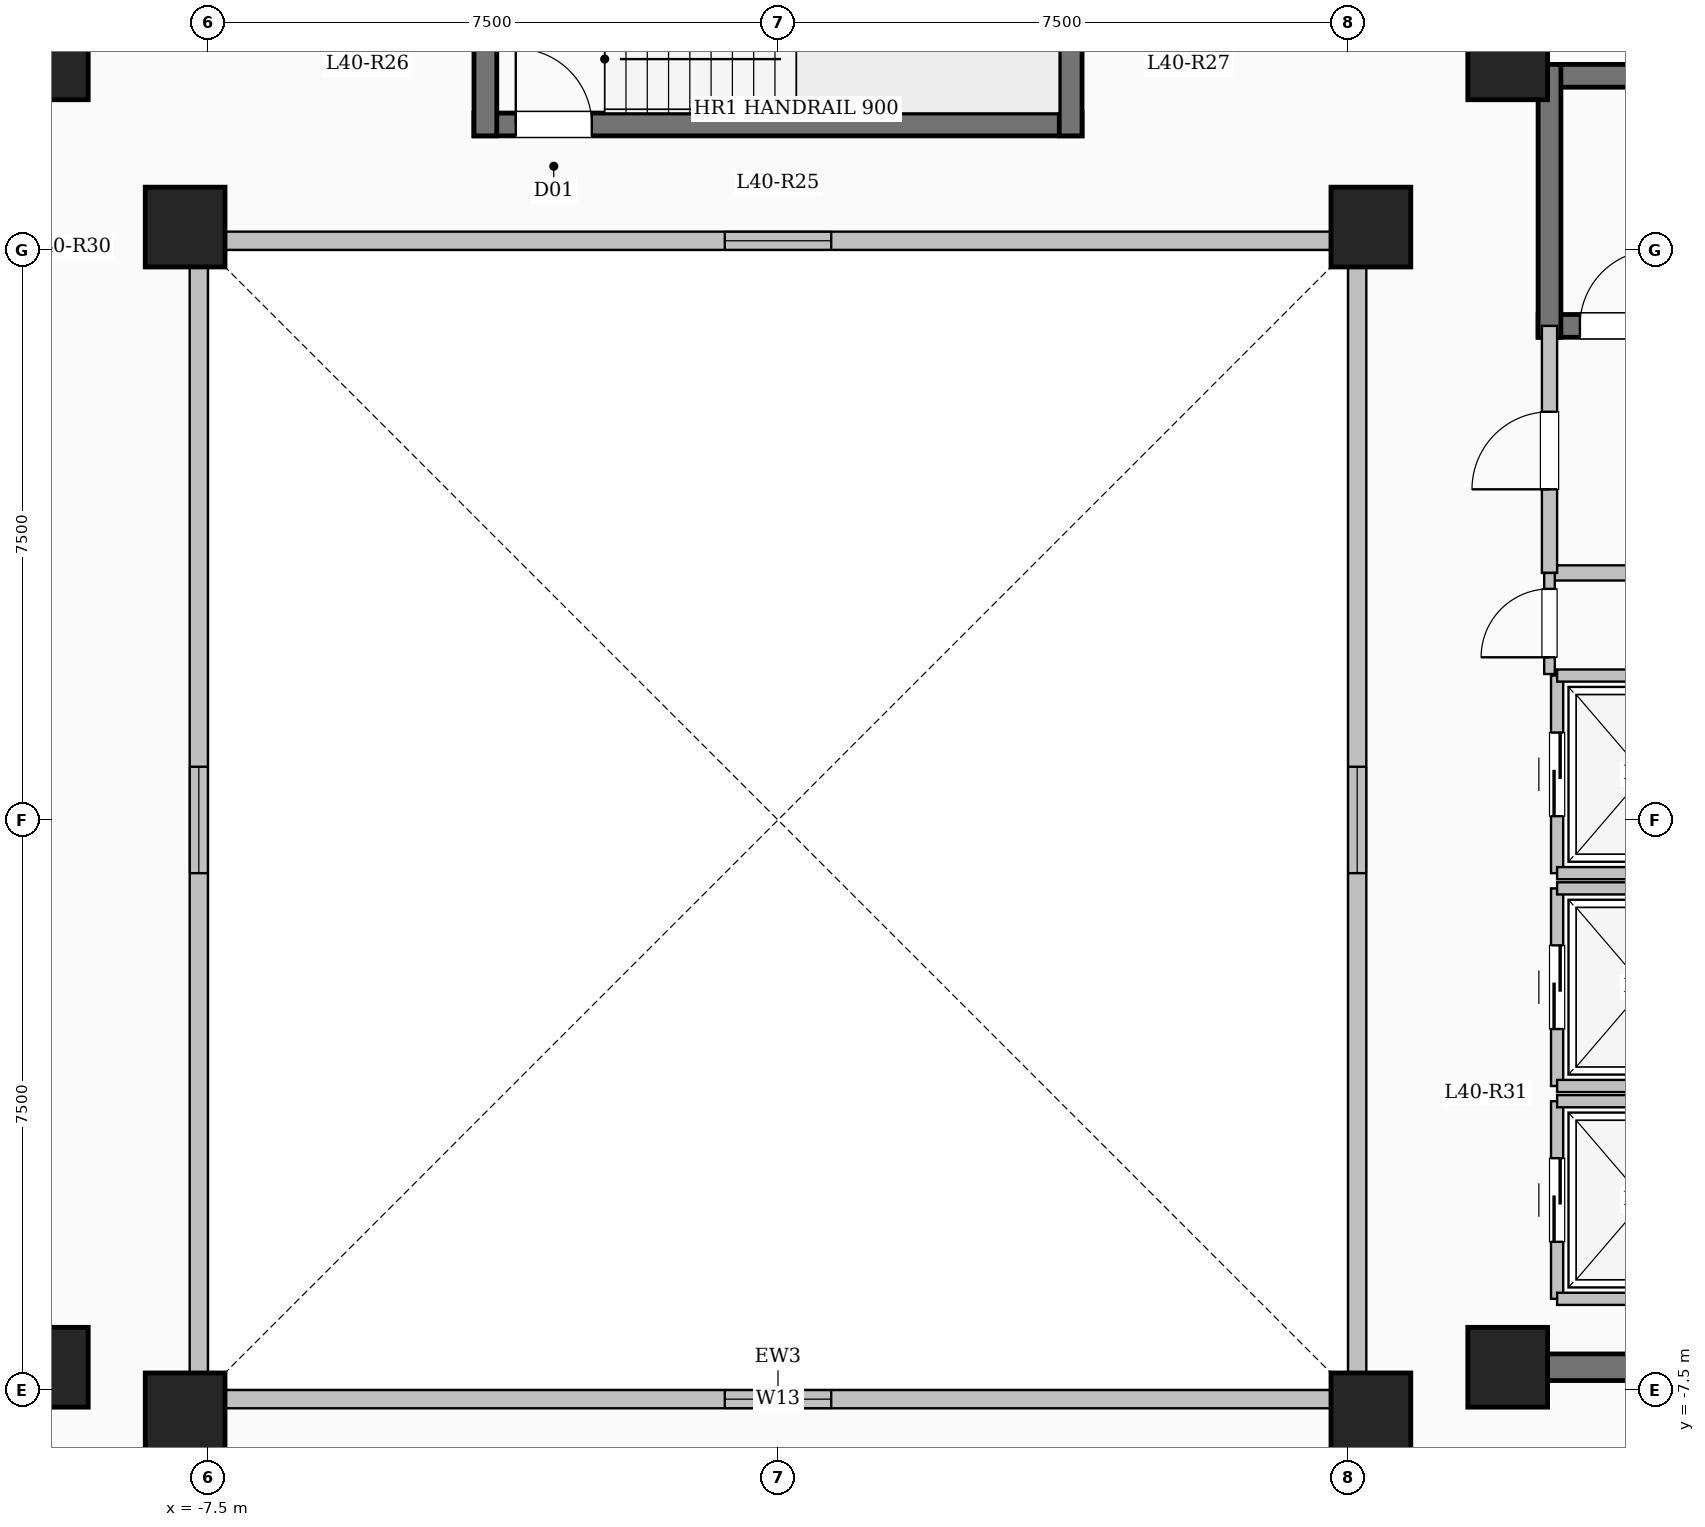
"""IFC4 building model, lengths in metres.
Left out: names, types, materials, properties, quantities, classifications, styles, units other than length and angle.
Written with IfcOpenShell. Run it as: python <this file> out.ifc"""

import sys

from ifc_helpers import new_model, si_unit, direction, frame, frame_2d, origin, origin_2d, place, context, subcontext, project, spatial, rectangle, extrude, element, fill, save


model = new_model("IFC4")
c1 = context("Model", 3, precision=1e-05, world=origin(), true_north=direction((0.0, 1.0)))
c2 = subcontext(c1, "Body", "Model", "MODEL_VIEW")
j1 = project(units=[si_unit("LENGTHUNIT", "METRE"), si_unit("PLANEANGLEUNIT", "RADIAN")], contexts=[c1])
p1 = place(None, origin())
s1 = spatial("IfcSite", under=j1, at=p1, CompositionType="ELEMENT")
p2 = place(p1, origin())
s2 = spatial("IfcBuilding", under=s1, at=p2, CompositionType="ELEMENT")
p3 = place(p2, frame((0.0, 0.0, 149.35)))
s3 = spatial("IfcBuildingStorey", under=s2, at=p3, CompositionType="ELEMENT", Elevation=149.35)
for number, where, z_axis, x_axis in (
    (1, (-7.8, -7.8, 0.0), (0.0, 0.0, 1.0), (1.0, 0.0, 0.0)),
    (2, (7.8, -7.8, 0.0), (0.0, 0.0, 1.0), (1.0, 0.0, 0.0)),
    (3, (-7.8, 7.8, 0.0), (0.0, 0.0, 1.0), (1.0, 0.0, 0.0)),
    (4, (7.8, 7.8, 0.0), (0.0, 0.0, 1.0), (1.0, 0.0, 0.0)),
    (5, (-9.6, -7.2, 0.0), (0.0, 0.0, 1.0), (1.0, 0.0, 0.0)),
    (6, (-9.6, 10.0, 0.0), (0.0, 0.0, 1.0), (1.0, 0.0, 0.0)),
    (7, (9.6, -7.2, 0.0), (0.0, 0.0, 1.0), (1.0, 0.0, 0.0)),
    (8, (9.6, 10.0, 0.0), (0.0, 0.0, 1.0), (1.0, 0.0, 0.0)),
):
    element("IfcColumn", number, at=place(p3, frame(where, z_axis=z_axis, x_axis=x_axis)), inside=s3, PredefinedType="COLUMN", context=c2, shape_type="SweptSolid", body=[
        extrude(rectangle(XDim=1.05, YDim=1.05, at=origin_2d()), origin(), (0.0, 0.0, 1.0), 3.35),
    ])
p4 = place(p3, frame((-7.62, -7.62, 0.0), z_axis=(0.0, 0.0, 1.0), x_axis=(1.0, 0.0, 0.0)))
e9 = element("IfcWall", 9, at=p4, inside=s3, PredefinedType="SOLIDWALL", context=c2, shape_type="SweptSolid", body=[
    extrude(rectangle(XDim=15.24, YDim=0.24, at=frame_2d((7.62, 0.0))), origin(), (0.0, 0.0, 1.0), 3.1),
])
p5 = place(p4, frame((6.92, 0.0, 0.95)))
e10 = element("IfcOpeningElement", 10, at=p5, cuts=e9, PredefinedType="OPENING", context=c2, shape_type="SweptSolid", body=[
    extrude(rectangle(XDim=1.4, YDim=1.5, at=frame_2d((0.7, 0.75))), frame((0.0, 0.13, 0.0), z_axis=(0.0, -1.0, 0.0), x_axis=(1.0, 0.0, 0.0)), (0.0, 0.0, 1.0), 0.26),
])
p6 = place(p3, frame((7.62, -7.62, 0.0), z_axis=(0.0, 0.0, 1.0), x_axis=(0.0, 1.0, 0.0)))
e11 = element("IfcWall", 11, at=p6, inside=s3, PredefinedType="SOLIDWALL", context=c2, shape_type="SweptSolid", body=[
    extrude(rectangle(XDim=15.24, YDim=0.24, at=frame_2d((7.62, 0.0))), origin(), (0.0, 0.0, 1.0), 3.1),
])
p7 = place(p6, frame((6.92, 0.0, 0.95)))
e12 = element("IfcOpeningElement", 12, at=p7, cuts=e11, PredefinedType="OPENING", context=c2, shape_type="SweptSolid", body=[
    extrude(rectangle(XDim=1.4, YDim=1.5, at=frame_2d((0.7, 0.75))), frame((0.0, 0.13, 0.0), z_axis=(0.0, -1.0, 0.0), x_axis=(1.0, 0.0, 0.0)), (0.0, 0.0, 1.0), 0.26),
])
p8 = place(p3, frame((7.62, 7.62, 0.0), z_axis=(0.0, 0.0, 1.0), x_axis=(-1.0, 0.0, 0.0)))
e13 = element("IfcWall", 13, at=p8, inside=s3, PredefinedType="SOLIDWALL", context=c2, shape_type="SweptSolid", body=[
    extrude(rectangle(XDim=15.24, YDim=0.24, at=frame_2d((7.62, 0.0))), origin(), (0.0, 0.0, 1.0), 3.1),
])
p9 = place(p8, frame((6.92, 0.0, 0.95)))
e14 = element("IfcOpeningElement", 14, at=p9, cuts=e13, PredefinedType="OPENING", context=c2, shape_type="SweptSolid", body=[
    extrude(rectangle(XDim=1.4, YDim=1.5, at=frame_2d((0.7, 0.75))), frame((0.0, 0.13, 0.0), z_axis=(0.0, -1.0, 0.0), x_axis=(1.0, 0.0, 0.0)), (0.0, 0.0, 1.0), 0.26),
])
p10 = place(p3, frame((-7.62, 7.62, 0.0), z_axis=(0.0, 0.0, 1.0), x_axis=(0.0, -1.0, 0.0)))
e15 = element("IfcWall", 15, at=p10, inside=s3, PredefinedType="SOLIDWALL", context=c2, shape_type="SweptSolid", body=[
    extrude(rectangle(XDim=15.24, YDim=0.24, at=frame_2d((7.62, 0.0))), origin(), (0.0, 0.0, 1.0), 3.1),
])
p11 = place(p10, frame((6.92, 0.0, 0.95)))
e16 = element("IfcOpeningElement", 16, at=p11, cuts=e15, PredefinedType="OPENING", context=c2, shape_type="SweptSolid", body=[
    extrude(rectangle(XDim=1.4, YDim=1.5, at=frame_2d((0.7, 0.75))), frame((0.0, 0.13, 0.0), z_axis=(0.0, -1.0, 0.0), x_axis=(1.0, 0.0, 0.0)), (0.0, 0.0, 1.0), 0.26),
])
p12 = place(p3, frame((10.0, 9.79, 0.0), z_axis=(0.0, 0.0, 1.0), x_axis=(1.0, 0.0, 0.0)))
e17 = element("IfcWall", 17, at=p12, inside=s3, PredefinedType="SHEAR", context=c2, shape_type="SweptSolid", body=[
    extrude(rectangle(XDim=8.0, YDim=0.3, at=frame_2d((4.0, 0.0))), origin(), (0.0, 0.0, 1.0), 3.35),
])
p13 = place(p3, frame((10.0, 6.5, 0.0), z_axis=(0.0, 0.0, 1.0), x_axis=(1.0, 0.0, 0.0)))
e18 = element("IfcWall", 18, at=p13, inside=s3, PredefinedType="SHEAR", context=c2, shape_type="SweptSolid", body=[
    extrude(rectangle(XDim=8.0, YDim=0.3, at=frame_2d((4.0, 0.0))), origin(), (0.0, 0.0, 1.0), 3.35),
])
p14 = place(p13, frame((0.55, 0.0, 0.0)))
e19 = element("IfcOpeningElement", 19, at=p14, cuts=e18, PredefinedType="OPENING", context=c2, shape_type="SweptSolid", body=[
    extrude(rectangle(XDim=1.0, YDim=2.15, at=frame_2d((0.5, 1.075))), frame((0.0, 0.16, 0.0), z_axis=(0.0, -1.0, 0.0), x_axis=(1.0, 0.0, 0.0)), (0.0, 0.0, 1.0), 0.32),
])
p15 = place(p3, frame((10.15, 6.35, 0.0), z_axis=(0.0, 0.0, 1.0), x_axis=(0.0, 1.0, 0.0)))
e20 = element("IfcWall", 20, at=p15, inside=s3, PredefinedType="SHEAR", context=c2, shape_type="SweptSolid", body=[
    extrude(rectangle(XDim=3.59, YDim=0.3, at=frame_2d((1.795, 0.0))), origin(), (0.0, 0.0, 1.0), 3.35),
])
p16 = place(p3, frame((-4.0, 9.15, 0.0), z_axis=(0.0, 0.0, 1.0), x_axis=(1.0, 0.0, 0.0)))
e21 = element("IfcWall", 21, at=p16, inside=s3, PredefinedType="SHEAR", context=c2, shape_type="SweptSolid", body=[
    extrude(rectangle(XDim=8.0, YDim=0.3, at=frame_2d((4.0, 0.0))), origin(), (0.0, 0.0, 1.0), 3.35),
])
p17 = place(p16, frame((0.55, 0.0, 0.0)))
e22 = element("IfcOpeningElement", 22, at=p17, cuts=e21, PredefinedType="OPENING", context=c2, shape_type="SweptSolid", body=[
    extrude(rectangle(XDim=1.0, YDim=2.15, at=frame_2d((0.5, 1.075))), frame((0.0, 0.16, 0.0), z_axis=(0.0, -1.0, 0.0), x_axis=(1.0, 0.0, 0.0)), (0.0, 0.0, 1.0), 0.32),
])
for number, where, z_axis, x_axis in (
    (23, (-3.85, 9.0, 0.0), (0.0, 0.0, 1.0), (0.0, 1.0, 0.0)),
    (24, (3.85, 9.0, 0.0), (0.0, 0.0, 1.0), (0.0, 1.0, 0.0)),
):
    element("IfcWall", number, at=place(p3, frame(where, z_axis=z_axis, x_axis=x_axis)), inside=s3, PredefinedType="SHEAR", context=c2, shape_type="SweptSolid", body=[
        extrude(rectangle(XDim=3.59, YDim=0.3, at=frame_2d((1.795, 0.0))), origin(), (0.0, 0.0, 1.0), 3.35),
    ])
p18 = place(p3, frame((10.15, 3.25, 0.0), z_axis=(0.0, 0.0, 1.0), x_axis=(1.0, 0.0, 0.0)))
e25 = element("IfcWall", 25, at=p18, inside=s3, PredefinedType="SOLIDWALL", context=c2, shape_type="SweptSolid", body=[
    extrude(rectangle(XDim=5.4, YDim=0.2, at=frame_2d((2.7, 0.0))), origin(), (0.0, 0.0, 1.0), 3.1),
])
p19 = place(p3, frame((10.15, 3.25, 0.0), z_axis=(0.0, 0.0, 1.0), x_axis=(0.0, 1.0, 0.0)))
e26 = element("IfcWall", 26, at=p19, inside=s3, PredefinedType="SOLIDWALL", context=c2, shape_type="SweptSolid", body=[
    extrude(rectangle(XDim=3.25, YDim=0.2, at=frame_2d((1.625, 0.0))), origin(), (0.0, 0.0, 1.0), 3.1),
])
p20 = place(p19, frame((1.1, 0.0, 0.0)))
e27 = element("IfcOpeningElement", 27, at=p20, cuts=e26, PredefinedType="OPENING", context=c2, shape_type="SweptSolid", body=[
    extrude(rectangle(XDim=1.02, YDim=2.15, at=frame_2d((0.51, 1.075))), frame((0.0, 0.11, 0.0), z_axis=(0.0, -1.0, 0.0), x_axis=(1.0, 0.0, 0.0)), (0.0, 0.0, 1.0), 0.22),
])
p21 = place(p3, frame((10.25, -6.3, 0.0), z_axis=(0.0, 0.0, 1.0), x_axis=(0.0, 1.0, 0.0)))
e28 = element("IfcWall", 28, at=p21, inside=s3, PredefinedType="SOLIDWALL", context=c2, shape_type="SweptSolid", body=[
    extrude(rectangle(XDim=2.6, YDim=0.16, at=frame_2d((1.3, 0.0))), origin(), (0.0, 0.0, 1.0), 3.1),
])
p22 = place(p21, frame((0.75, 0.0, 0.0)))
e29 = element("IfcOpeningElement", 29, at=p22, cuts=e28, PredefinedType="OPENING", context=c2, shape_type="SweptSolid", body=[
    extrude(rectangle(XDim=1.1, YDim=2.15, at=frame_2d((0.55, 1.075))), frame((0.0, 0.09, 0.0), z_axis=(0.0, -1.0, 0.0), x_axis=(1.0, 0.0, 0.0)), (0.0, 0.0, 1.0), 0.18),
])
for number, where, z_axis, x_axis in (
    (30, (10.25, -6.3, 0.0), (0.0, 0.0, 1.0), (1.0, 0.0, 0.0)),
    (31, (10.25, -3.7, 0.0), (0.0, 0.0, 1.0), (1.0, 0.0, 0.0)),
):
    element("IfcWall", number, at=place(p3, frame(where, z_axis=z_axis, x_axis=x_axis)), inside=s3, PredefinedType="SOLIDWALL", context=c2, shape_type="SweptSolid", body=[
        extrude(rectangle(XDim=2.3, YDim=0.16, at=frame_2d((1.15, 0.0))), origin(), (0.0, 0.0, 1.0), 3.1),
    ])
p23 = place(p3, frame((10.25, -3.5, 0.0), z_axis=(0.0, 0.0, 1.0), x_axis=(0.0, 1.0, 0.0)))
e32 = element("IfcWall", 32, at=p23, inside=s3, PredefinedType="SOLIDWALL", context=c2, shape_type="SweptSolid", body=[
    extrude(rectangle(XDim=2.6, YDim=0.16, at=frame_2d((1.3, 0.0))), origin(), (0.0, 0.0, 1.0), 3.1),
])
p24 = place(p23, frame((0.75, 0.0, 0.0)))
e33 = element("IfcOpeningElement", 33, at=p24, cuts=e32, PredefinedType="OPENING", context=c2, shape_type="SweptSolid", body=[
    extrude(rectangle(XDim=1.1, YDim=2.15, at=frame_2d((0.55, 1.075))), frame((0.0, 0.09, 0.0), z_axis=(0.0, -1.0, 0.0), x_axis=(1.0, 0.0, 0.0)), (0.0, 0.0, 1.0), 0.18),
])
for number, where, z_axis, x_axis in (
    (34, (10.25, -3.5, 0.0), (0.0, 0.0, 1.0), (1.0, 0.0, 0.0)),
    (35, (10.25, -0.9, 0.0), (0.0, 0.0, 1.0), (1.0, 0.0, 0.0)),
):
    element("IfcWall", number, at=place(p3, frame(where, z_axis=z_axis, x_axis=x_axis)), inside=s3, PredefinedType="SOLIDWALL", context=c2, shape_type="SweptSolid", body=[
        extrude(rectangle(XDim=2.3, YDim=0.16, at=frame_2d((1.15, 0.0))), origin(), (0.0, 0.0, 1.0), 3.1),
    ])
p25 = place(p3, frame((10.25, -0.7, 0.0), z_axis=(0.0, 0.0, 1.0), x_axis=(0.0, 1.0, 0.0)))
e36 = element("IfcWall", 36, at=p25, inside=s3, PredefinedType="SOLIDWALL", context=c2, shape_type="SweptSolid", body=[
    extrude(rectangle(XDim=2.6, YDim=0.16, at=frame_2d((1.3, 0.0))), origin(), (0.0, 0.0, 1.0), 3.1),
])
p26 = place(p25, frame((0.75, 0.0, 0.0)))
e37 = element("IfcOpeningElement", 37, at=p26, cuts=e36, PredefinedType="OPENING", context=c2, shape_type="SweptSolid", body=[
    extrude(rectangle(XDim=1.1, YDim=2.15, at=frame_2d((0.55, 1.075))), frame((0.0, 0.09, 0.0), z_axis=(0.0, -1.0, 0.0), x_axis=(1.0, 0.0, 0.0)), (0.0, 0.0, 1.0), 0.18),
])
for number, where, z_axis, x_axis in (
    (38, (10.25, -0.7, 0.0), (0.0, 0.0, 1.0), (1.0, 0.0, 0.0)),
    (39, (10.25, 1.9, 0.0), (0.0, 0.0, 1.0), (1.0, 0.0, 0.0)),
):
    element("IfcWall", number, at=place(p3, frame(where, z_axis=z_axis, x_axis=x_axis)), inside=s3, PredefinedType="SOLIDWALL", context=c2, shape_type="SweptSolid", body=[
        extrude(rectangle(XDim=2.3, YDim=0.16, at=frame_2d((1.15, 0.0))), origin(), (0.0, 0.0, 1.0), 3.1),
    ])
p27 = place(p3, frame((10.075, -7.2, 0.0), z_axis=(0.0, 0.0, 1.0), x_axis=(1.0, 0.0, 0.0)))
e40 = element("IfcWall", 40, at=p27, inside=s3, PredefinedType="SHEAR", context=c2, shape_type="SweptSolid", body=[
    extrude(rectangle(XDim=8.55, YDim=0.35, at=frame_2d((4.275, 0.0))), origin(), (0.0, 0.0, 1.0), 3.35),
])
p28 = place(p3, frame((10.15, 1.92, 0.0), z_axis=(0.0, 0.0, 1.0), x_axis=(0.0, 1.0, 0.0)))
e41 = element("IfcWall", 41, at=p28, inside=s3, PredefinedType="PARTITIONING", context=c2, shape_type="SweptSolid", body=[
    extrude(rectangle(XDim=1.33, YDim=0.14, at=frame_2d((0.665, 0.0))), origin(), (0.0, 0.0, 1.0), 3.1),
])
p29 = place(p28, frame((0.22, 0.0, 0.0)))
e42 = element("IfcOpeningElement", 42, at=p29, cuts=e41, PredefinedType="OPENING", context=c2, shape_type="SweptSolid", body=[
    extrude(rectangle(XDim=0.9, YDim=2.08, at=frame_2d((0.45, 1.04))), frame((0.0, 0.08, 0.0), z_axis=(0.0, -1.0, 0.0), x_axis=(1.0, 0.0, 0.0)), (0.0, 0.0, 1.0), 0.16),
])
p30 = place(p5, origin())
e43 = element("IfcWindow", 43, at=p30, inside=s3, PartitioningType="SINGLE_PANEL", PredefinedType="WINDOW", context=c2, shape_type="SweptSolid", body=[
    extrude(rectangle(XDim=1.4, YDim=1.5, at=frame_2d((0.7, 0.75))), frame((0.0, 0.03, 0.0), z_axis=(0.0, -1.0, 0.0), x_axis=(1.0, 0.0, 0.0)), (0.0, 0.0, 1.0), 0.06),
])
fill(e10, e43)
p31 = place(p7, origin())
e44 = element("IfcWindow", 44, at=p31, inside=s3, PartitioningType="SINGLE_PANEL", PredefinedType="WINDOW", context=c2, shape_type="SweptSolid", body=[
    extrude(rectangle(XDim=1.4, YDim=1.5, at=frame_2d((0.7, 0.75))), frame((0.0, 0.03, 0.0), z_axis=(0.0, -1.0, 0.0), x_axis=(1.0, 0.0, 0.0)), (0.0, 0.0, 1.0), 0.06),
])
fill(e12, e44)
p32 = place(p9, origin())
e45 = element("IfcWindow", 45, at=p32, inside=s3, PartitioningType="SINGLE_PANEL", PredefinedType="WINDOW", context=c2, shape_type="SweptSolid", body=[
    extrude(rectangle(XDim=1.4, YDim=1.5, at=frame_2d((0.7, 0.75))), frame((0.0, 0.03, 0.0), z_axis=(0.0, -1.0, 0.0), x_axis=(1.0, 0.0, 0.0)), (0.0, 0.0, 1.0), 0.06),
])
fill(e14, e45)
p33 = place(p11, origin())
e46 = element("IfcWindow", 46, at=p33, inside=s3, PartitioningType="SINGLE_PANEL", PredefinedType="WINDOW", context=c2, shape_type="SweptSolid", body=[
    extrude(rectangle(XDim=1.4, YDim=1.5, at=frame_2d((0.7, 0.75))), frame((0.0, 0.03, 0.0), z_axis=(0.0, -1.0, 0.0), x_axis=(1.0, 0.0, 0.0)), (0.0, 0.0, 1.0), 0.06),
])
fill(e16, e46)
p34 = place(p14, origin())
e47 = element("IfcDoor", 47, at=p34, inside=s3, OperationType="SINGLE_SWING_RIGHT", PredefinedType="DOOR", context=c2, shape_type="SweptSolid", body=[
    extrude(rectangle(XDim=1.0, YDim=2.15, at=frame_2d((0.5, 1.075))), frame((0.0, 0.025, 0.0), z_axis=(0.0, -1.0, 0.0), x_axis=(1.0, 0.0, 0.0)), (0.0, 0.0, 1.0), 0.05),
])
fill(e19, e47)
p35 = place(p17, origin())
e48 = element("IfcDoor", 48, at=p35, inside=s3, OperationType="SINGLE_SWING_LEFT", PredefinedType="DOOR", context=c2, shape_type="SweptSolid", body=[
    extrude(rectangle(XDim=1.0, YDim=2.15, at=frame_2d((0.5, 1.075))), frame((0.0, 0.025, 0.0), z_axis=(0.0, -1.0, 0.0), x_axis=(1.0, 0.0, 0.0)), (0.0, 0.0, 1.0), 0.05),
])
fill(e22, e48)
p36 = place(p20, origin())
e49 = element("IfcDoor", 49, at=p36, inside=s3, OperationType="SINGLE_SWING_LEFT", PredefinedType="DOOR", context=c2, shape_type="SweptSolid", body=[
    extrude(rectangle(XDim=1.02, YDim=2.15, at=frame_2d((0.51, 1.075))), frame((0.0, 0.025, 0.0), z_axis=(0.0, -1.0, 0.0), x_axis=(1.0, 0.0, 0.0)), (0.0, 0.0, 1.0), 0.05),
])
fill(e27, e49)
p37 = place(p22, origin())
e50 = element("IfcDoor", 50, at=p37, inside=s3, OperationType="SLIDING_TO_LEFT", PredefinedType="DOOR", context=c2, shape_type="SweptSolid", body=[
    extrude(rectangle(XDim=1.1, YDim=2.15, at=frame_2d((0.55, 1.075))), frame((0.0, 0.025, 0.0), z_axis=(0.0, -1.0, 0.0), x_axis=(1.0, 0.0, 0.0)), (0.0, 0.0, 1.0), 0.05),
])
fill(e29, e50)
p38 = place(p24, origin())
e51 = element("IfcDoor", 51, at=p38, inside=s3, OperationType="SLIDING_TO_LEFT", PredefinedType="DOOR", context=c2, shape_type="SweptSolid", body=[
    extrude(rectangle(XDim=1.1, YDim=2.15, at=frame_2d((0.55, 1.075))), frame((0.0, 0.025, 0.0), z_axis=(0.0, -1.0, 0.0), x_axis=(1.0, 0.0, 0.0)), (0.0, 0.0, 1.0), 0.05),
])
fill(e33, e51)
p39 = place(p26, origin())
e52 = element("IfcDoor", 52, at=p39, inside=s3, OperationType="SLIDING_TO_LEFT", PredefinedType="DOOR", context=c2, shape_type="SweptSolid", body=[
    extrude(rectangle(XDim=1.1, YDim=2.15, at=frame_2d((0.55, 1.075))), frame((0.0, 0.025, 0.0), z_axis=(0.0, -1.0, 0.0), x_axis=(1.0, 0.0, 0.0)), (0.0, 0.0, 1.0), 0.05),
])
fill(e37, e52)
p40 = place(p29, origin())
e53 = element("IfcDoor", 53, at=p40, inside=s3, OperationType="SINGLE_SWING_LEFT", PredefinedType="DOOR", context=c2, shape_type="SweptSolid", body=[
    extrude(rectangle(XDim=0.9, YDim=2.08, at=frame_2d((0.45, 1.04))), frame((0.0, 0.025, 0.0), z_axis=(0.0, -1.0, 0.0), x_axis=(1.0, 0.0, 0.0)), (0.0, 0.0, 1.0), 0.05),
])
fill(e42, e53)
save(model, sys.argv[1])
